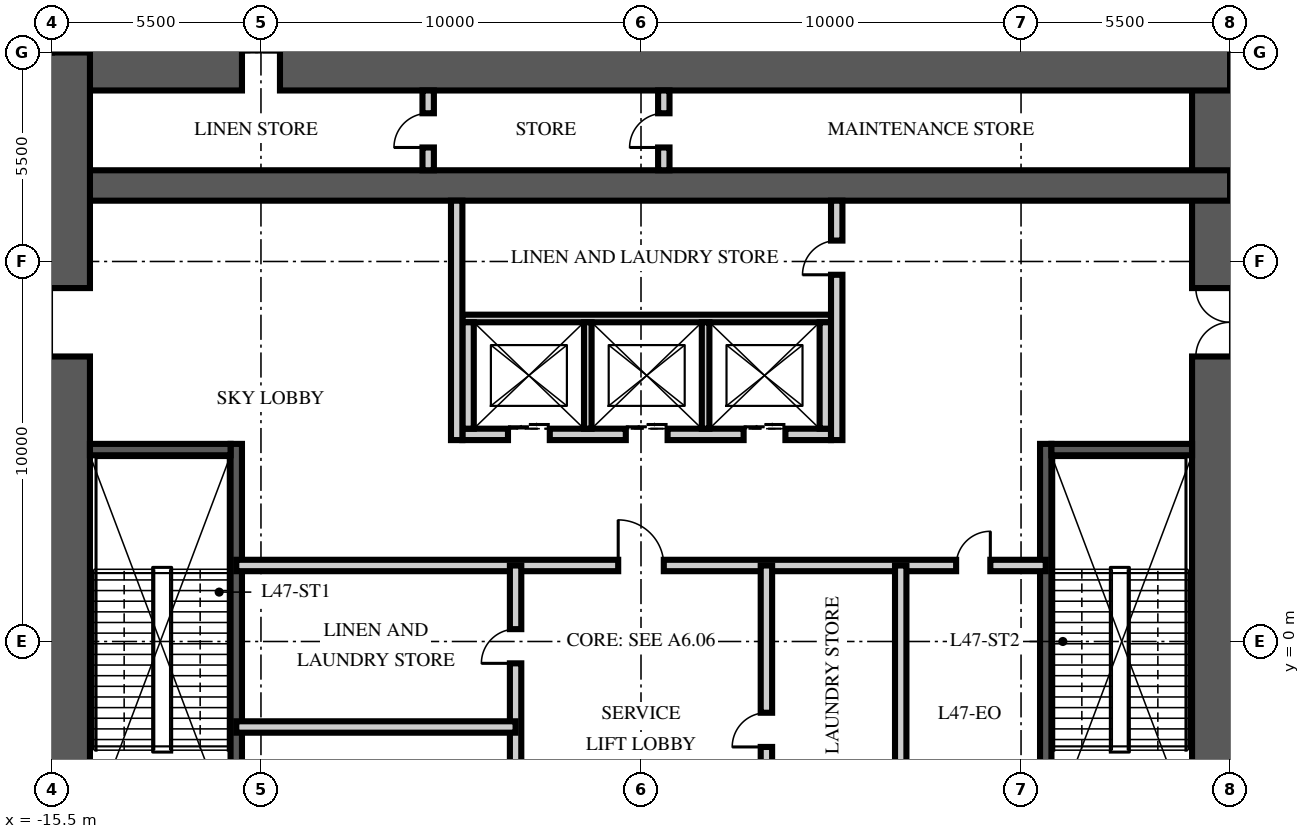
"""IFC4 building model, lengths in metres.
Left out: names, types, materials, properties, quantities, classifications, styles, units other than length and angle.
Written with IfcOpenShell. Run it as: python <this file> out.ifc"""

import sys

from ifc_helpers import new_model, si_unit, direction, frame, frame_2d, origin, place, context, subcontext, project, spatial, rectangle, extrude, element, fill, save


model = new_model("IFC4")
c1 = context("Model", 3, precision=1e-05, world=origin(), true_north=direction((0.0, 1.0)))
c2 = subcontext(c1, "Body", "Model", "MODEL_VIEW")
j1 = project(units=[si_unit("LENGTHUNIT", "METRE"), si_unit("PLANEANGLEUNIT", "RADIAN")], contexts=[c1])
p1 = place(None, origin())
s1 = spatial("IfcSite", under=j1, at=p1, CompositionType="ELEMENT")
p2 = place(p1, origin())
s2 = spatial("IfcBuilding", under=s1, at=p2, CompositionType="ELEMENT")
p3 = place(p2, frame((0.0, 0.0, 186.0)))
s3 = spatial("IfcBuildingStorey", under=s2, at=p3, CompositionType="ELEMENT", Elevation=186.0)
p4 = place(p3, frame((15.5, -15.5, -0.3), z_axis=(0.0, 0.0, 1.0), x_axis=(0.0, 1.0, 0.0)))
e1 = element("IfcWall", 1, at=p4, inside=s3, PredefinedType="SHEAR", context=c2, shape_type="SweptSolid", body=[
    extrude(rectangle(XDim=31.0, YDim=2.0, at=frame_2d((15.5, 0.0))), origin(), (0.0, 0.0, 1.0), 5.95),
])
p5 = place(p4, frame((6.5, 0.0, 0.3)))
e2 = element("IfcOpeningElement", 2, at=p5, cuts=e1, PredefinedType="OPENING", context=c2, shape_type="SweptSolid", body=[
    extrude(rectangle(XDim=1.2, YDim=2.1, at=frame_2d((0.6, 1.05))), frame((0.0, 1.01, 0.0), z_axis=(0.0, -1.0, 0.0), x_axis=(1.0, 0.0, 0.0)), (0.0, 0.0, 1.0), 2.02),
])
p6 = place(p4, frame((23.0, 0.0, 0.3)))
e3 = element("IfcOpeningElement", 3, at=p6, cuts=e1, PredefinedType="OPENING", context=c2, shape_type="SweptSolid", body=[
    extrude(rectangle(XDim=1.8, YDim=2.1, at=frame_2d((0.9, 1.05))), frame((0.0, 1.01, 0.0), z_axis=(0.0, -1.0, 0.0), x_axis=(1.0, 0.0, 0.0)), (0.0, 0.0, 1.0), 2.02),
])
p7 = place(p3, frame((-15.5, 15.5, -0.3), z_axis=(0.0, 0.0, 1.0), x_axis=(1.0, 0.0, 0.0)))
e4 = element("IfcWall", 4, at=p7, inside=s3, PredefinedType="SHEAR", context=c2, shape_type="SweptSolid", body=[
    extrude(rectangle(XDim=31.0, YDim=2.0, at=frame_2d((15.5, 0.0))), origin(), (0.0, 0.0, 1.0), 5.95),
])
p8 = place(p7, frame((5.0, 0.0, 0.3)))
e5 = element("IfcOpeningElement", 5, at=p8, cuts=e4, PredefinedType="OPENING", context=c2, shape_type="SweptSolid", body=[
    extrude(rectangle(XDim=1.0, YDim=2.1, at=frame_2d((0.5, 1.05))), frame((0.0, 1.01, 0.0), z_axis=(0.0, -1.0, 0.0), x_axis=(1.0, 0.0, 0.0)), (0.0, 0.0, 1.0), 2.02),
])
p9 = place(p3, frame((-15.5, 12.0, -0.3), z_axis=(0.0, 0.0, 1.0), x_axis=(1.0, 0.0, 0.0)))
e6 = element("IfcWall", 6, at=p9, inside=s3, PredefinedType="SHEAR", context=c2, shape_type="SweptSolid", body=[
    extrude(rectangle(XDim=31.0, YDim=0.8, at=frame_2d((15.5, 0.0))), origin(), (0.0, 0.0, 1.0), 5.95),
])
p10 = place(p3, frame((-15.5, -15.5, -0.3), z_axis=(0.0, 0.0, 1.0), x_axis=(0.0, 1.0, 0.0)))
e7 = element("IfcWall", 7, at=p10, inside=s3, PredefinedType="SHEAR", context=c2, shape_type="SweptSolid", body=[
    extrude(rectangle(XDim=31.0, YDim=2.0, at=frame_2d((15.5, 0.0))), origin(), (0.0, 0.0, 1.0), 5.95),
])
p11 = place(p10, frame((6.5, 0.0, 0.3)))
e8 = element("IfcOpeningElement", 8, at=p11, cuts=e7, PredefinedType="OPENING", context=c2, shape_type="SweptSolid", body=[
    extrude(rectangle(XDim=1.2, YDim=2.1, at=frame_2d((0.6, 1.05))), frame((0.0, 1.01, 0.0), z_axis=(0.0, -1.0, 0.0), x_axis=(1.0, 0.0, 0.0)), (0.0, 0.0, 1.0), 2.02),
])
p12 = place(p10, frame((23.0, 0.0, 0.3)))
e9 = element("IfcOpeningElement", 9, at=p12, cuts=e7, PredefinedType="OPENING", context=c2, shape_type="SweptSolid", body=[
    extrude(rectangle(XDim=1.8, YDim=2.1, at=frame_2d((0.9, 1.05))), frame((0.0, 1.01, 0.0), z_axis=(0.0, -1.0, 0.0), x_axis=(1.0, 0.0, 0.0)), (0.0, 0.0, 1.0), 2.02),
])
p13 = place(p3, frame((-10.65, -4.9, 0.0), z_axis=(0.0, 0.0, 1.0), x_axis=(0.0, 1.0, 0.0)))
e10 = element("IfcWall", 10, at=p13, inside=s3, PredefinedType="SOLIDWALL", context=c2, shape_type="SweptSolid", body=[
    extrude(rectangle(XDim=10.1, YDim=0.3, at=frame_2d((5.05, 0.0))), origin(), (0.0, 0.0, 1.0), 5.65),
])
p14 = place(p3, frame((-14.5, 5.05, 0.0), z_axis=(0.0, 0.0, 1.0), x_axis=(1.0, 0.0, 0.0)))
e11 = element("IfcWall", 11, at=p14, inside=s3, PredefinedType="SOLIDWALL", context=c2, shape_type="SweptSolid", body=[
    extrude(rectangle(XDim=3.7, YDim=0.3, at=frame_2d((1.85, 0.0))), origin(), (0.0, 0.0, 1.0), 5.65),
])
p15 = place(p3, frame((10.65, -4.9, 0.0), z_axis=(0.0, 0.0, 1.0), x_axis=(0.0, 1.0, 0.0)))
e12 = element("IfcWall", 12, at=p15, inside=s3, PredefinedType="SOLIDWALL", context=c2, shape_type="SweptSolid", body=[
    extrude(rectangle(XDim=10.1, YDim=0.3, at=frame_2d((5.05, 0.0))), origin(), (0.0, 0.0, 1.0), 5.65),
])
p16 = place(p3, frame((14.5, 5.05, 0.0), z_axis=(0.0, 0.0, 1.0), x_axis=(-1.0, 0.0, 0.0)))
e13 = element("IfcWall", 13, at=p16, inside=s3, PredefinedType="SOLIDWALL", context=c2, shape_type="SweptSolid", body=[
    extrude(rectangle(XDim=3.7, YDim=0.3, at=frame_2d((1.85, 0.0))), origin(), (0.0, 0.0, 1.0), 5.65),
])
p17 = place(p3, frame((-4.7, 5.45, 0.0), z_axis=(0.0, 0.0, 1.0), x_axis=(1.0, 0.0, 0.0)))
e14 = element("IfcWall", 14, at=p17, inside=s3, PredefinedType="PARTITIONING", context=c2, shape_type="SweptSolid", body=[
    extrude(rectangle(XDim=9.7, YDim=0.3, at=frame_2d((4.85, 0.0))), origin(), (0.0, 0.0, 1.0), 5.65),
])
p18 = place(p17, frame((1.2, 0.0, 0.0)))
e15 = element("IfcOpeningElement", 15, at=p18, cuts=e14, PredefinedType="OPENING", context=c2, shape_type="SweptSolid", body=[
    extrude(rectangle(XDim=1.1, YDim=2.1, at=frame_2d((0.55, 1.05))), frame((0.0, 0.16, 0.0), z_axis=(0.0, -1.0, 0.0), x_axis=(1.0, 0.0, 0.0)), (0.0, 0.0, 1.0), 0.32),
])
p19 = place(p17, frame((4.3, 0.0, 0.0)))
e16 = element("IfcOpeningElement", 16, at=p19, cuts=e14, PredefinedType="OPENING", context=c2, shape_type="SweptSolid", body=[
    extrude(rectangle(XDim=1.1, YDim=2.1, at=frame_2d((0.55, 1.05))), frame((0.0, 0.16, 0.0), z_axis=(0.0, -1.0, 0.0), x_axis=(1.0, 0.0, 0.0)), (0.0, 0.0, 1.0), 0.32),
])
p20 = place(p17, frame((7.4, 0.0, 0.0)))
e17 = element("IfcOpeningElement", 17, at=p20, cuts=e14, PredefinedType="OPENING", context=c2, shape_type="SweptSolid", body=[
    extrude(rectangle(XDim=1.1, YDim=2.1, at=frame_2d((0.55, 1.05))), frame((0.0, 0.16, 0.0), z_axis=(0.0, -1.0, 0.0), x_axis=(1.0, 0.0, 0.0)), (0.0, 0.0, 1.0), 0.32),
])
p21 = place(p3, frame((-4.7, 8.5, 0.0), z_axis=(0.0, 0.0, 1.0), x_axis=(1.0, 0.0, 0.0)))
e18 = element("IfcWall", 18, at=p21, inside=s3, PredefinedType="PARTITIONING", context=c2, shape_type="SweptSolid", body=[
    extrude(rectangle(XDim=9.7, YDim=0.2, at=frame_2d((4.85, 0.0))), origin(), (0.0, 0.0, 1.0), 5.65),
])
for number, where, z_axis, x_axis in (
    (19, (-4.55, 5.6, 0.0), (0.0, 0.0, 1.0), (0.0, 1.0, 0.0)),
    (20, (4.85, 5.6, 0.0), (0.0, 0.0, 1.0), (0.0, 1.0, 0.0)),
):
    element("IfcWall", number, at=place(p3, frame(where, z_axis=z_axis, x_axis=x_axis)), inside=s3, PredefinedType="PARTITIONING", context=c2, shape_type="SweptSolid", body=[
        extrude(rectangle(XDim=2.8, YDim=0.3, at=frame_2d((1.4, 0.0))), origin(), (0.0, 0.0, 1.0), 5.65),
    ])
for number, where, z_axis, x_axis in (
    (21, (-1.4, 5.6, 0.0), (0.0, 0.0, 1.0), (0.0, 1.0, 0.0)),
    (22, (1.7, 5.6, 0.0), (0.0, 0.0, 1.0), (0.0, 1.0, 0.0)),
):
    element("IfcWall", number, at=place(p3, frame(where, z_axis=z_axis, x_axis=x_axis)), inside=s3, PredefinedType="PARTITIONING", context=c2, shape_type="SweptSolid", body=[
        extrude(rectangle(XDim=2.8, YDim=0.2, at=frame_2d((1.4, 0.0))), origin(), (0.0, 0.0, 1.0), 5.65),
    ])
p22 = place(p3, frame((-10.65, 2.0, 0.0), z_axis=(0.0, 0.0, 1.0), x_axis=(1.0, 0.0, 0.0)))
e23 = element("IfcWall", 23, at=p22, inside=s3, PredefinedType="PARTITIONING", context=c2, shape_type="SweptSolid", body=[
    extrude(rectangle(XDim=21.3, YDim=0.3, at=frame_2d((10.65, 0.0))), origin(), (0.0, 0.0, 1.0), 5.65),
])
p23 = place(p22, frame((10.05, 0.0, 0.0)))
e24 = element("IfcOpeningElement", 24, at=p23, cuts=e23, PredefinedType="OPENING", context=c2, shape_type="SweptSolid", body=[
    extrude(rectangle(XDim=1.2, YDim=2.1, at=frame_2d((0.6, 1.05))), frame((0.0, 0.16, 0.0), z_axis=(0.0, -1.0, 0.0), x_axis=(1.0, 0.0, 0.0)), (0.0, 0.0, 1.0), 0.32),
])
p24 = place(p22, frame((18.942, 0.0, 0.0)))
e25 = element("IfcOpeningElement", 25, at=p24, cuts=e23, PredefinedType="OPENING", context=c2, shape_type="SweptSolid", body=[
    extrude(rectangle(XDim=0.9, YDim=2.1, at=frame_2d((0.45, 1.05))), frame((0.0, 0.16, 0.0), z_axis=(0.0, -1.0, 0.0), x_axis=(1.0, 0.0, 0.0)), (0.0, 0.0, 1.0), 0.32),
])
p25 = place(p3, frame((-3.3, -6.65, 0.0), z_axis=(0.0, 0.0, 1.0), x_axis=(0.0, 1.0, 0.0)))
e26 = element("IfcWall", 26, at=p25, inside=s3, PredefinedType="PARTITIONING", context=c2, shape_type="SweptSolid", body=[
    extrude(rectangle(XDim=8.65, YDim=0.3, at=frame_2d((4.325, 0.0))), origin(), (0.0, 0.0, 1.0), 5.65),
])
p26 = place(p25, frame((1.75, 0.0, 0.0)))
e27 = element("IfcOpeningElement", 27, at=p26, cuts=e26, PredefinedType="OPENING", context=c2, shape_type="SweptSolid", body=[
    extrude(rectangle(XDim=0.9, YDim=2.1, at=frame_2d((0.45, 1.05))), frame((0.0, 0.16, 0.0), z_axis=(0.0, -1.0, 0.0), x_axis=(1.0, 0.0, 0.0)), (0.0, 0.0, 1.0), 0.32),
])
p27 = place(p25, frame((6.075, 0.0, 0.0)))
e28 = element("IfcOpeningElement", 28, at=p27, cuts=e26, PredefinedType="OPENING", context=c2, shape_type="SweptSolid", body=[
    extrude(rectangle(XDim=0.9, YDim=2.1, at=frame_2d((0.45, 1.05))), frame((0.0, 0.16, 0.0), z_axis=(0.0, -1.0, 0.0), x_axis=(1.0, 0.0, 0.0)), (0.0, 0.0, 1.0), 0.32),
])
p28 = place(p3, frame((3.3, -6.65, 0.0), z_axis=(0.0, 0.0, 1.0), x_axis=(0.0, 1.0, 0.0)))
e29 = element("IfcWall", 29, at=p28, inside=s3, PredefinedType="PARTITIONING", context=c2, shape_type="SweptSolid", body=[
    extrude(rectangle(XDim=8.65, YDim=0.3, at=frame_2d((4.325, 0.0))), origin(), (0.0, 0.0, 1.0), 5.65),
])
p29 = place(p28, frame((3.875, 0.0, 0.0)))
e30 = element("IfcOpeningElement", 30, at=p29, cuts=e29, PredefinedType="OPENING", context=c2, shape_type="SweptSolid", body=[
    extrude(rectangle(XDim=0.9, YDim=2.1, at=frame_2d((0.45, 1.05))), frame((0.0, 0.16, 0.0), z_axis=(0.0, -1.0, 0.0), x_axis=(1.0, 0.0, 0.0)), (0.0, 0.0, 1.0), 0.32),
])
p30 = place(p3, frame((-10.65, -2.25, 0.0), z_axis=(0.0, 0.0, 1.0), x_axis=(1.0, 0.0, 0.0)))
e31 = element("IfcWall", 31, at=p30, inside=s3, PredefinedType="PARTITIONING", context=c2, shape_type="SweptSolid", body=[
    extrude(rectangle(XDim=7.35, YDim=0.3, at=frame_2d((3.675, 0.0))), origin(), (0.0, 0.0, 1.0), 5.65),
])
p31 = place(p3, frame((6.834, -6.65, 0.0), z_axis=(0.0, 0.0, 1.0), x_axis=(0.0, 1.0, 0.0)))
e32 = element("IfcWall", 32, at=p31, inside=s3, PredefinedType="PARTITIONING", context=c2, shape_type="SweptSolid", body=[
    extrude(rectangle(XDim=8.65, YDim=0.3, at=frame_2d((4.325, 0.0))), origin(), (0.0, 0.0, 1.0), 5.65),
])
p32 = place(p3, frame((-4.85, 5.3, 0.0), z_axis=(0.0, 0.0, 1.0), x_axis=(0.0, 1.0, 0.0)))
e33 = element("IfcWall", 33, at=p32, inside=s3, PredefinedType="PARTITIONING", context=c2, shape_type="SweptSolid", body=[
    extrude(rectangle(XDim=6.3, YDim=0.3, at=frame_2d((3.15, 0.0))), origin(), (0.0, 0.0, 1.0), 5.65),
])
p33 = place(p3, frame((5.15, 5.3, 0.0), z_axis=(0.0, 0.0, 1.0), x_axis=(0.0, 1.0, 0.0)))
e34 = element("IfcWall", 34, at=p33, inside=s3, PredefinedType="PARTITIONING", context=c2, shape_type="SweptSolid", body=[
    extrude(rectangle(XDim=6.3, YDim=0.3, at=frame_2d((3.15, 0.0))), origin(), (0.0, 0.0, 1.0), 5.65),
])
p34 = place(p33, frame((4.35, 0.0, 0.0)))
e35 = element("IfcOpeningElement", 35, at=p34, cuts=e34, PredefinedType="OPENING", context=c2, shape_type="SweptSolid", body=[
    extrude(rectangle(XDim=0.9, YDim=2.1, at=frame_2d((0.45, 1.05))), frame((0.0, 0.16, 0.0), z_axis=(0.0, -1.0, 0.0), x_axis=(1.0, 0.0, 0.0)), (0.0, 0.0, 1.0), 0.32),
])
p35 = place(p3, frame((-5.6, 12.4, 0.0), z_axis=(0.0, 0.0, 1.0), x_axis=(0.0, 1.0, 0.0)))
e36 = element("IfcWall", 36, at=p35, inside=s3, PredefinedType="PARTITIONING", context=c2, shape_type="SweptSolid", body=[
    extrude(rectangle(XDim=2.1, YDim=0.3, at=frame_2d((1.05, 0.0))), origin(), (0.0, 0.0, 1.0), 5.65),
])
p36 = place(p35, frame((0.6, 0.0, 0.0)))
e37 = element("IfcOpeningElement", 37, at=p36, cuts=e36, PredefinedType="OPENING", context=c2, shape_type="SweptSolid", body=[
    extrude(rectangle(XDim=0.9, YDim=2.1, at=frame_2d((0.45, 1.05))), frame((0.0, 0.16, 0.0), z_axis=(0.0, -1.0, 0.0), x_axis=(1.0, 0.0, 0.0)), (0.0, 0.0, 1.0), 0.32),
])
p37 = place(p3, frame((0.6, 12.4, 0.0), z_axis=(0.0, 0.0, 1.0), x_axis=(0.0, 1.0, 0.0)))
e38 = element("IfcWall", 38, at=p37, inside=s3, PredefinedType="PARTITIONING", context=c2, shape_type="SweptSolid", body=[
    extrude(rectangle(XDim=2.1, YDim=0.3, at=frame_2d((1.05, 0.0))), origin(), (0.0, 0.0, 1.0), 5.65),
])
p38 = place(p37, frame((0.6, 0.0, 0.0)))
e39 = element("IfcOpeningElement", 39, at=p38, cuts=e38, PredefinedType="OPENING", context=c2, shape_type="SweptSolid", body=[
    extrude(rectangle(XDim=0.9, YDim=2.1, at=frame_2d((0.45, 1.05))), frame((0.0, 0.16, 0.0), z_axis=(0.0, -1.0, 0.0), x_axis=(1.0, 0.0, 0.0)), (0.0, 0.0, 1.0), 0.32),
])
p39 = place(p12, origin())
e40 = element("IfcDoor", 40, at=p39, inside=s3, OperationType="DOUBLE_DOOR_SINGLE_SWING", PredefinedType="DOOR", context=c2, shape_type="SweptSolid", body=[
    extrude(rectangle(XDim=1.8, YDim=2.1, at=frame_2d((0.9, 1.05))), frame((0.0, 0.025, 0.0), z_axis=(0.0, -1.0, 0.0), x_axis=(1.0, 0.0, 0.0)), (0.0, 0.0, 1.0), 0.05),
])
fill(e9, e40)
p40 = place(p6, origin())
e41 = element("IfcDoor", 41, at=p40, inside=s3, OperationType="DOUBLE_DOOR_SINGLE_SWING", PredefinedType="DOOR", context=c2, shape_type="SweptSolid", body=[
    extrude(rectangle(XDim=1.8, YDim=2.1, at=frame_2d((0.9, 1.05))), frame((0.0, 0.025, 0.0), z_axis=(0.0, -1.0, 0.0), x_axis=(1.0, 0.0, 0.0)), (0.0, 0.0, 1.0), 0.05),
])
fill(e3, e41)
p41 = place(p18, origin())
e42 = element("IfcDoor", 42, at=p41, inside=s3, OperationType="DOUBLE_DOOR_SLIDING", PredefinedType="DOOR", context=c2, shape_type="SweptSolid", body=[
    extrude(rectangle(XDim=1.1, YDim=2.1, at=frame_2d((0.55, 1.05))), frame((0.0, 0.025, 0.0), z_axis=(0.0, -1.0, 0.0), x_axis=(1.0, 0.0, 0.0)), (0.0, 0.0, 1.0), 0.05),
])
fill(e15, e42)
p42 = place(p19, origin())
e43 = element("IfcDoor", 43, at=p42, inside=s3, OperationType="DOUBLE_DOOR_SLIDING", PredefinedType="DOOR", context=c2, shape_type="SweptSolid", body=[
    extrude(rectangle(XDim=1.1, YDim=2.1, at=frame_2d((0.55, 1.05))), frame((0.0, 0.025, 0.0), z_axis=(0.0, -1.0, 0.0), x_axis=(1.0, 0.0, 0.0)), (0.0, 0.0, 1.0), 0.05),
])
fill(e16, e43)
p43 = place(p20, origin())
e44 = element("IfcDoor", 44, at=p43, inside=s3, OperationType="DOUBLE_DOOR_SLIDING", PredefinedType="DOOR", context=c2, shape_type="SweptSolid", body=[
    extrude(rectangle(XDim=1.1, YDim=2.1, at=frame_2d((0.55, 1.05))), frame((0.0, 0.025, 0.0), z_axis=(0.0, -1.0, 0.0), x_axis=(1.0, 0.0, 0.0)), (0.0, 0.0, 1.0), 0.05),
])
fill(e17, e44)
p44 = place(p23, origin())
e45 = element("IfcDoor", 45, at=p44, inside=s3, OperationType="SINGLE_SWING_LEFT", PredefinedType="DOOR", context=c2, shape_type="SweptSolid", body=[
    extrude(rectangle(XDim=1.2, YDim=2.1, at=frame_2d((0.6, 1.05))), frame((0.0, 0.025, 0.0), z_axis=(0.0, -1.0, 0.0), x_axis=(1.0, 0.0, 0.0)), (0.0, 0.0, 1.0), 0.05),
])
fill(e24, e45)
p45 = place(p27, origin())
e46 = element("IfcDoor", 46, at=p45, inside=s3, OperationType="SINGLE_SWING_LEFT", PredefinedType="DOOR", context=c2, shape_type="SweptSolid", body=[
    extrude(rectangle(XDim=0.9, YDim=2.1, at=frame_2d((0.45, 1.05))), frame((0.0, 0.025, 0.0), z_axis=(0.0, -1.0, 0.0), x_axis=(1.0, 0.0, 0.0)), (0.0, 0.0, 1.0), 0.05),
])
fill(e28, e46)
p46 = place(p29, origin())
e47 = element("IfcDoor", 47, at=p46, inside=s3, OperationType="SINGLE_SWING_LEFT", PredefinedType="DOOR", context=c2, shape_type="SweptSolid", body=[
    extrude(rectangle(XDim=0.9, YDim=2.1, at=frame_2d((0.45, 1.05))), frame((0.0, 0.025, 0.0), z_axis=(0.0, -1.0, 0.0), x_axis=(1.0, 0.0, 0.0)), (0.0, 0.0, 1.0), 0.05),
])
fill(e30, e47)
p47 = place(p24, origin())
e48 = element("IfcDoor", 48, at=p47, inside=s3, OperationType="SINGLE_SWING_RIGHT", PredefinedType="DOOR", context=c2, shape_type="SweptSolid", body=[
    extrude(rectangle(XDim=0.9, YDim=2.1, at=frame_2d((0.45, 1.05))), frame((0.0, 0.025, 0.0), z_axis=(0.0, -1.0, 0.0), x_axis=(1.0, 0.0, 0.0)), (0.0, 0.0, 1.0), 0.05),
])
fill(e25, e48)
p48 = place(p34, origin())
e49 = element("IfcDoor", 49, at=p48, inside=s3, OperationType="SINGLE_SWING_LEFT", PredefinedType="DOOR", context=c2, shape_type="SweptSolid", body=[
    extrude(rectangle(XDim=0.9, YDim=2.1, at=frame_2d((0.45, 1.05))), frame((0.0, 0.025, 0.0), z_axis=(0.0, -1.0, 0.0), x_axis=(1.0, 0.0, 0.0)), (0.0, 0.0, 1.0), 0.05),
])
fill(e35, e49)
p49 = place(p36, origin())
e50 = element("IfcDoor", 50, at=p49, inside=s3, OperationType="SINGLE_SWING_LEFT", PredefinedType="DOOR", context=c2, shape_type="SweptSolid", body=[
    extrude(rectangle(XDim=0.9, YDim=2.1, at=frame_2d((0.45, 1.05))), frame((0.0, 0.025, 0.0), z_axis=(0.0, -1.0, 0.0), x_axis=(1.0, 0.0, 0.0)), (0.0, 0.0, 1.0), 0.05),
])
fill(e37, e50)
p50 = place(p38, origin())
e51 = element("IfcDoor", 51, at=p50, inside=s3, OperationType="SINGLE_SWING_LEFT", PredefinedType="DOOR", context=c2, shape_type="SweptSolid", body=[
    extrude(rectangle(XDim=0.9, YDim=2.1, at=frame_2d((0.45, 1.05))), frame((0.0, 0.025, 0.0), z_axis=(0.0, -1.0, 0.0), x_axis=(1.0, 0.0, 0.0)), (0.0, 0.0, 1.0), 0.05),
])
fill(e39, e51)
p51 = place(p8, origin())
e52 = element("IfcDoor", 52, at=p51, inside=s3, OperationType="SINGLE_SWING_LEFT", PredefinedType="DOOR", context=c2, shape_type="SweptSolid", body=[
    extrude(rectangle(XDim=1.0, YDim=2.1, at=frame_2d((0.5, 1.05))), frame((0.0, 0.025, 0.0), z_axis=(0.0, -1.0, 0.0), x_axis=(1.0, 0.0, 0.0)), (0.0, 0.0, 1.0), 0.05),
])
fill(e5, e52)
save(model, sys.argv[1])
